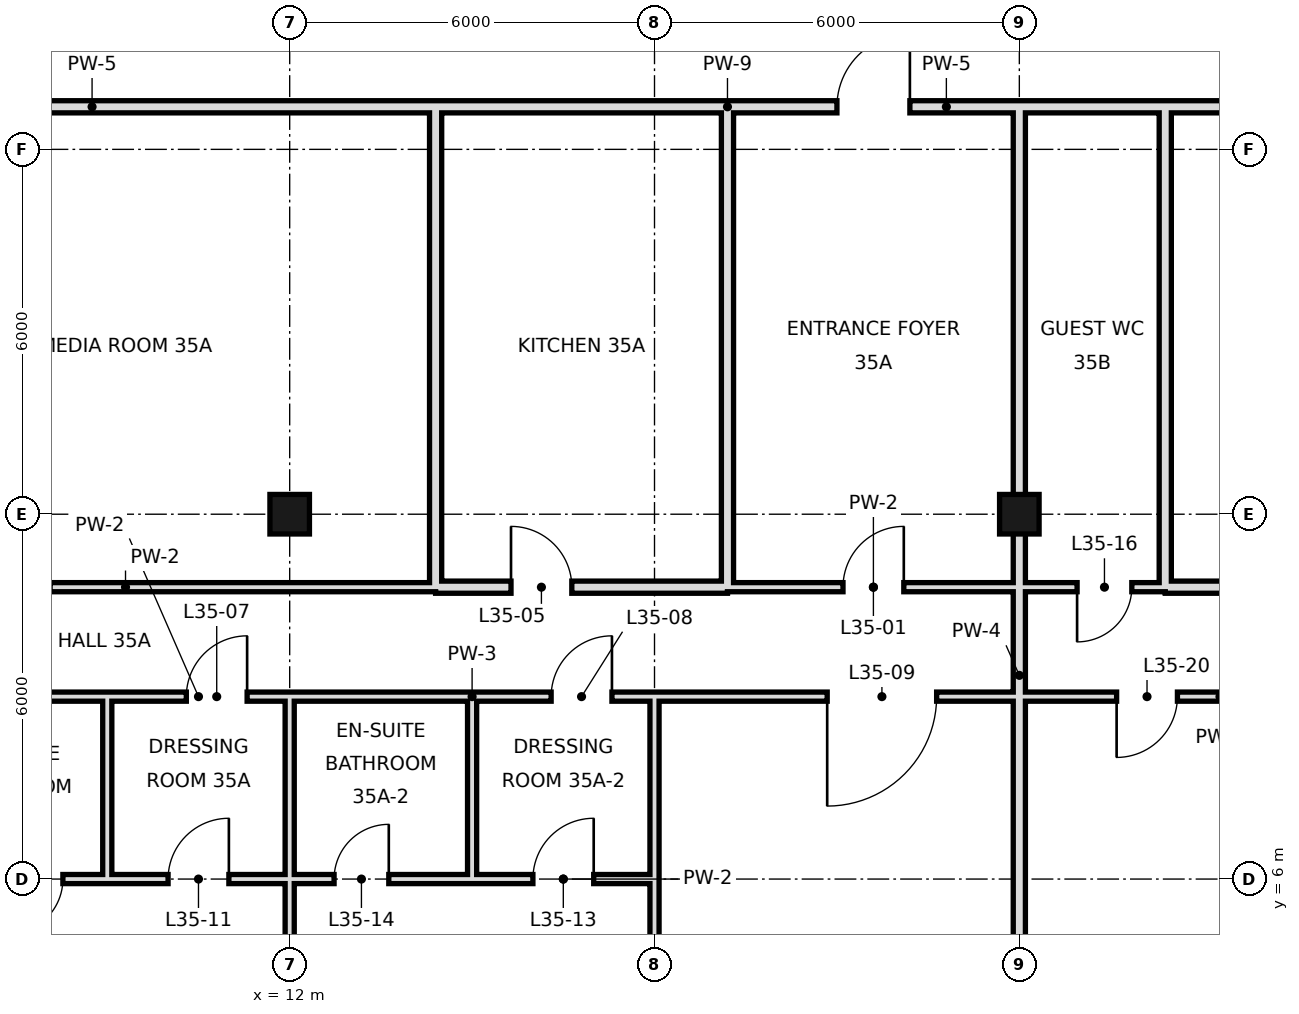
"""IFC4 building model, lengths in metres.
Left out: names, types, materials, properties, quantities, classifications, styles, units other than length and angle.
Written with IfcOpenShell. Run it as: python <this file> out.ifc"""

import sys

from ifc_helpers import new_model, si_unit, direction, frame, frame_2d, origin, origin_2d, place, context, subcontext, project, spatial, rectangle, hollow_rectangle, extrude, element, fill, save


model = new_model("IFC4")
c1 = context("Model", 3, precision=1e-05, world=origin(), true_north=direction((0.0, 1.0)))
c2 = subcontext(c1, "Body", "Model", "MODEL_VIEW")
j1 = project(units=[si_unit("LENGTHUNIT", "METRE"), si_unit("PLANEANGLEUNIT", "RADIAN")], contexts=[c1])
p1 = place(None, origin())
s1 = spatial("IfcSite", under=j1, at=p1, CompositionType="ELEMENT")
p2 = place(p1, origin())
s2 = spatial("IfcBuilding", under=s1, at=p2, CompositionType="ELEMENT")
p3 = place(p2, frame((0.0, 0.0, 154.6)))
s3 = spatial("IfcBuildingStorey", under=s2, at=p3, CompositionType="ELEMENT", Elevation=154.6)
for number, where, z_axis, x_axis in (
    (1, (12.0, 12.0, 0.0), (0.0, 0.0, 1.0), (1.0, 0.0, 0.0)),
    (2, (24.0, 12.0, 0.0), (0.0, 0.0, 1.0), (1.0, 0.0, 0.0)),
):
    element("IfcColumn", number, at=place(p3, frame(where, z_axis=z_axis, x_axis=x_axis)), inside=s3, PredefinedType="COLUMN", context=c2, shape_type="SweptSolid", body=[
        extrude(hollow_rectangle(XDim=0.65, YDim=0.65, WallThickness=0.032, at=origin_2d()), origin(), (0.0, 0.0, 1.0), 3.6),
    ])
p4 = place(p3, frame((12.0, 0.0, 0.0), z_axis=(0.0, 0.0, 1.0), x_axis=(0.0, 1.0, 0.0)))
e3 = element("IfcWall", 3, at=p4, inside=s3, PredefinedType="PARTITIONING", context=c2, shape_type="SweptSolid", body=[
    extrude(rectangle(XDim=6.0, YDim=0.15, at=frame_2d((3.0, 0.0))), origin(), (0.0, 0.0, 1.0), 2.72),
])
p5 = place(p3, frame((12.0, 6.0, 0.0), z_axis=(0.0, 0.0, 1.0), x_axis=(0.0, 1.0, 0.0)))
e4 = element("IfcWall", 4, at=p5, inside=s3, PredefinedType="PARTITIONING", context=c2, shape_type="SweptSolid", body=[
    extrude(rectangle(XDim=3.0, YDim=0.15, at=frame_2d((1.5, 0.0))), origin(), (0.0, 0.0, 1.0), 2.72),
])
p6 = place(p3, frame((14.4, 10.8, 0.0), z_axis=(0.0, 0.0, 1.0), x_axis=(0.0, 1.0, 0.0)))
e5 = element("IfcWall", 5, at=p6, inside=s3, PredefinedType="SOLIDWALL", context=c2, shape_type="SweptSolid", body=[
    extrude(rectangle(XDim=7.9, YDim=0.2, at=frame_2d((3.95, 0.0))), origin(), (0.0, 0.0, 1.0), 2.72),
])
p7 = place(p3, frame((15.0, 6.0, 0.0), z_axis=(0.0, 0.0, 1.0), x_axis=(0.0, 1.0, 0.0)))
e6 = element("IfcWall", 6, at=p7, inside=s3, PredefinedType="PARTITIONING", context=c2, shape_type="SweptSolid", body=[
    extrude(rectangle(XDim=3.0, YDim=0.15, at=frame_2d((1.5, 0.0))), origin(), (0.0, 0.0, 1.0), 3.42),
])
p8 = place(p3, frame((18.0, -0.6, 0.0), z_axis=(0.0, 0.0, 1.0), x_axis=(0.0, 1.0, 0.0)))
e7 = element("IfcWall", 7, at=p8, inside=s3, PredefinedType="PARTITIONING", context=c2, shape_type="SweptSolid", body=[
    extrude(rectangle(XDim=9.6, YDim=0.15, at=frame_2d((4.8, 0.0))), origin(), (0.0, 0.0, 1.0), 2.72),
])
p9 = place(p3, frame((19.2, 10.8, 0.0), z_axis=(0.0, 0.0, 1.0), x_axis=(0.0, 1.0, 0.0)))
e8 = element("IfcWall", 8, at=p9, inside=s3, PredefinedType="SOLIDWALL", context=c2, shape_type="SweptSolid", body=[
    extrude(rectangle(XDim=7.9, YDim=0.2, at=frame_2d((3.95, 0.0))), origin(), (0.0, 0.0, 1.0), 2.72),
])
p10 = place(p3, frame((24.0, 0.0, 0.0), z_axis=(0.0, 0.0, 1.0), x_axis=(0.0, 1.0, 0.0)))
e9 = element("IfcWall", 9, at=p10, inside=s3, PredefinedType="SOLIDWALL", context=c2, shape_type="SweptSolid", body=[
    extrude(rectangle(XDim=18.7, YDim=0.2, at=frame_2d((9.35, 0.0))), origin(), (0.0, 0.0, 1.0), 2.72),
])
p11 = place(p3, frame((26.4, 10.8, 0.0), z_axis=(0.0, 0.0, 1.0), x_axis=(0.0, 1.0, 0.0)))
e10 = element("IfcWall", 10, at=p11, inside=s3, PredefinedType="SOLIDWALL", context=c2, shape_type="SweptSolid", body=[
    extrude(rectangle(XDim=7.9, YDim=0.2, at=frame_2d((3.95, 0.0))), origin(), (0.0, 0.0, 1.0), 2.72),
])
p12 = place(p3, frame((9.0, 6.0, 0.0), z_axis=(0.0, 0.0, 1.0), x_axis=(0.0, 1.0, 0.0)))
e11 = element("IfcWall", 11, at=p12, inside=s3, PredefinedType="PARTITIONING", context=c2, shape_type="SweptSolid", body=[
    extrude(rectangle(XDim=3.0, YDim=0.15, at=frame_2d((1.5, 0.0))), origin(), (0.0, 0.0, 1.0), 3.42),
])
p13 = place(p3, frame((14.4, 10.8, 0.0), z_axis=(0.0, 0.0, 1.0), x_axis=(1.0, 0.0, 0.0)))
e12 = element("IfcWall", 12, at=p13, inside=s3, PredefinedType="SOLIDWALL", context=c2, shape_type="SweptSolid", body=[
    extrude(rectangle(XDim=4.8, YDim=0.2, at=frame_2d((2.4, 0.0))), origin(), (0.0, 0.0, 1.0), 2.72),
])
p14 = place(p13, frame((1.24, 0.0, 0.0)))
e13 = element("IfcOpeningElement", 13, at=p14, cuts=e12, PredefinedType="OPENING", context=c2, shape_type="SweptSolid", body=[
    extrude(rectangle(XDim=1.0, YDim=2.4, at=frame_2d((0.5, 1.2))), frame((0.0, 0.11, 0.0), z_axis=(0.0, -1.0, 0.0), x_axis=(1.0, 0.0, 0.0)), (0.0, 0.0, 1.0), 0.22),
])
p15 = place(p3, frame((26.4, 10.8, 0.0), z_axis=(0.0, 0.0, 1.0), x_axis=(1.0, 0.0, 0.0)))
e14 = element("IfcWall", 14, at=p15, inside=s3, PredefinedType="SOLIDWALL", context=c2, shape_type="SweptSolid", body=[
    extrude(rectangle(XDim=5.4, YDim=0.2, at=frame_2d((2.7, 0.0))), origin(), (0.0, 0.0, 1.0), 2.72),
])
p16 = place(p15, frame((2.2, 0.0, 0.0)))
e15 = element("IfcOpeningElement", 15, at=p16, cuts=e14, PredefinedType="OPENING", context=c2, shape_type="SweptSolid", body=[
    extrude(rectangle(XDim=1.0, YDim=2.4, at=frame_2d((0.5, 1.2))), frame((0.0, 0.11, 0.0), z_axis=(0.0, -1.0, 0.0), x_axis=(1.0, 0.0, 0.0)), (0.0, 0.0, 1.0), 0.22),
])
p17 = place(p3, frame((4.2, 10.8, 0.0), z_axis=(0.0, 0.0, 1.0), x_axis=(1.0, 0.0, 0.0)))
e16 = element("IfcWall", 16, at=p17, inside=s3, PredefinedType="PARTITIONING", context=c2, shape_type="SweptSolid", body=[
    extrude(rectangle(XDim=10.2, YDim=0.15, at=frame_2d((5.1, 0.0))), origin(), (0.0, 0.0, 1.0), 3.42),
])
p18 = place(p17, frame((2.86, 0.0, 0.0)))
e17 = element("IfcOpeningElement", 17, at=p18, cuts=e16, PredefinedType="OPENING", context=c2, shape_type="SweptSolid", body=[
    extrude(rectangle(XDim=1.0, YDim=2.4, at=frame_2d((0.5, 1.2))), frame((0.0, 0.085, 0.0), z_axis=(0.0, -1.0, 0.0), x_axis=(1.0, 0.0, 0.0)), (0.0, 0.0, 1.0), 0.17),
])
p19 = place(p3, frame((19.2, 10.8, 0.0), z_axis=(0.0, 0.0, 1.0), x_axis=(1.0, 0.0, 0.0)))
e18 = element("IfcWall", 18, at=p19, inside=s3, PredefinedType="PARTITIONING", context=c2, shape_type="SweptSolid", body=[
    extrude(rectangle(XDim=4.8, YDim=0.15, at=frame_2d((2.4, 0.0))), origin(), (0.0, 0.0, 1.0), 3.42),
])
p20 = place(p19, frame((1.9, 0.0, 0.0)))
e19 = element("IfcOpeningElement", 19, at=p20, cuts=e18, PredefinedType="OPENING", context=c2, shape_type="SweptSolid", body=[
    extrude(rectangle(XDim=1.0, YDim=2.4, at=frame_2d((0.5, 1.2))), frame((0.0, 0.085, 0.0), z_axis=(0.0, -1.0, 0.0), x_axis=(1.0, 0.0, 0.0)), (0.0, 0.0, 1.0), 0.17),
])
p21 = place(p3, frame((24.0, 10.8, 0.0), z_axis=(0.0, 0.0, 1.0), x_axis=(1.0, 0.0, 0.0)))
e20 = element("IfcWall", 20, at=p21, inside=s3, PredefinedType="PARTITIONING", context=c2, shape_type="SweptSolid", body=[
    extrude(rectangle(XDim=2.4, YDim=0.15, at=frame_2d((1.2, 0.0))), origin(), (0.0, 0.0, 1.0), 3.42),
])
p22 = place(p21, frame((0.95, 0.0, 0.0)))
e21 = element("IfcOpeningElement", 21, at=p22, cuts=e20, PredefinedType="OPENING", context=c2, shape_type="SweptSolid", body=[
    extrude(rectangle(XDim=0.9, YDim=2.4, at=frame_2d((0.45, 1.2))), frame((0.0, 0.085, 0.0), z_axis=(0.0, -1.0, 0.0), x_axis=(1.0, 0.0, 0.0)), (0.0, 0.0, 1.0), 0.17),
])
p23 = place(p3, frame((3.1, 18.7, 0.0), z_axis=(0.0, 0.0, 1.0), x_axis=(1.0, 0.0, 0.0)))
e22 = element("IfcWall", 22, at=p23, inside=s3, PredefinedType="SOLIDWALL", context=c2, shape_type="SweptSolid", body=[
    extrude(rectangle(XDim=11.3, YDim=0.2, at=frame_2d((5.65, 0.0))), origin(), (0.0, 0.0, 1.0), 2.72),
])
p24 = place(p3, frame((19.2, 18.7, 0.0), z_axis=(0.0, 0.0, 1.0), x_axis=(1.0, 0.0, 0.0)))
e23 = element("IfcWall", 23, at=p24, inside=s3, PredefinedType="SOLIDWALL", context=c2, shape_type="SweptSolid", body=[
    extrude(rectangle(XDim=7.2, YDim=0.2, at=frame_2d((3.6, 0.0))), origin(), (0.0, 0.0, 1.0), 3.42),
])
p25 = place(p24, frame((1.8, 0.0, 0.0)))
e24 = element("IfcOpeningElement", 24, at=p25, cuts=e23, PredefinedType="OPENING", context=c2, shape_type="SweptSolid", body=[
    extrude(rectangle(XDim=1.2, YDim=2.4, at=frame_2d((0.6, 1.2))), frame((0.0, 0.11, 0.0), z_axis=(0.0, -1.0, 0.0), x_axis=(1.0, 0.0, 0.0)), (0.0, 0.0, 1.0), 0.22),
])
p26 = place(p3, frame((14.4, 18.7, 0.0), z_axis=(0.0, 0.0, 1.0), x_axis=(1.0, 0.0, 0.0)))
e25 = element("IfcWall", 25, at=p26, inside=s3, PredefinedType="SOLIDWALL", context=c2, shape_type="SweptSolid", body=[
    extrude(rectangle(XDim=4.8, YDim=0.2, at=frame_2d((2.4, 0.0))), origin(), (0.0, 0.0, 1.0), 2.72),
])
p27 = place(p3, frame((26.4, 18.7, 0.0), z_axis=(0.0, 0.0, 1.0), x_axis=(1.0, 0.0, 0.0)))
e26 = element("IfcWall", 26, at=p27, inside=s3, PredefinedType="SOLIDWALL", context=c2, shape_type="SweptSolid", body=[
    extrude(rectangle(XDim=5.4, YDim=0.2, at=frame_2d((2.7, 0.0))), origin(), (0.0, 0.0, 1.0), 2.72),
])
p28 = place(p3, frame((9.0, 6.0, 0.0), z_axis=(0.0, 0.0, 1.0), x_axis=(1.0, 0.0, 0.0)))
e27 = element("IfcWall", 27, at=p28, inside=s3, PredefinedType="PARTITIONING", context=c2, shape_type="SweptSolid", body=[
    extrude(rectangle(XDim=3.0, YDim=0.15, at=frame_2d((1.5, 0.0))), origin(), (0.0, 0.0, 1.0), 2.97),
])
p29 = place(p28, frame((1.0, 0.0, 0.0)))
e28 = element("IfcOpeningElement", 28, at=p29, cuts=e27, PredefinedType="OPENING", context=c2, shape_type="SweptSolid", body=[
    extrude(rectangle(XDim=1.0, YDim=2.4, at=frame_2d((0.5, 1.2))), frame((0.0, 0.085, 0.0), z_axis=(0.0, -1.0, 0.0), x_axis=(1.0, 0.0, 0.0)), (0.0, 0.0, 1.0), 0.17),
])
p30 = place(p3, frame((15.0, 6.0, 0.0), z_axis=(0.0, 0.0, 1.0), x_axis=(1.0, 0.0, 0.0)))
e29 = element("IfcWall", 29, at=p30, inside=s3, PredefinedType="PARTITIONING", context=c2, shape_type="SweptSolid", body=[
    extrude(rectangle(XDim=3.0, YDim=0.15, at=frame_2d((1.5, 0.0))), origin(), (0.0, 0.0, 1.0), 2.97),
])
p31 = place(p30, frame((1.0, 0.0, 0.0)))
e30 = element("IfcOpeningElement", 30, at=p31, cuts=e29, PredefinedType="OPENING", context=c2, shape_type="SweptSolid", body=[
    extrude(rectangle(XDim=1.0, YDim=2.4, at=frame_2d((0.5, 1.2))), frame((0.0, 0.085, 0.0), z_axis=(0.0, -1.0, 0.0), x_axis=(1.0, 0.0, 0.0)), (0.0, 0.0, 1.0), 0.17),
])
p32 = place(p3, frame((6.0, 6.0, 0.0), z_axis=(0.0, 0.0, 1.0), x_axis=(1.0, 0.0, 0.0)))
e31 = element("IfcWall", 31, at=p32, inside=s3, PredefinedType="PARTITIONING", context=c2, shape_type="SweptSolid", body=[
    extrude(rectangle(XDim=3.0, YDim=0.15, at=frame_2d((1.5, 0.0))), origin(), (0.0, 0.0, 1.0), 2.97),
])
p33 = place(p32, frame((1.37, 0.0, 0.0)))
e32 = element("IfcOpeningElement", 32, at=p33, cuts=e31, PredefinedType="OPENING", context=c2, shape_type="SweptSolid", body=[
    extrude(rectangle(XDim=0.9, YDim=2.4, at=frame_2d((0.45, 1.2))), frame((0.0, 0.085, 0.0), z_axis=(0.0, -1.0, 0.0), x_axis=(1.0, 0.0, 0.0)), (0.0, 0.0, 1.0), 0.17),
])
p34 = place(p3, frame((12.0, 6.0, 0.0), z_axis=(0.0, 0.0, 1.0), x_axis=(1.0, 0.0, 0.0)))
e33 = element("IfcWall", 33, at=p34, inside=s3, PredefinedType="PARTITIONING", context=c2, shape_type="SweptSolid", body=[
    extrude(rectangle(XDim=3.0, YDim=0.15, at=frame_2d((1.5, 0.0))), origin(), (0.0, 0.0, 1.0), 2.97),
])
p35 = place(p34, frame((0.73, 0.0, 0.0)))
e34 = element("IfcOpeningElement", 34, at=p35, cuts=e33, PredefinedType="OPENING", context=c2, shape_type="SweptSolid", body=[
    extrude(rectangle(XDim=0.9, YDim=2.4, at=frame_2d((0.45, 1.2))), frame((0.0, 0.085, 0.0), z_axis=(0.0, -1.0, 0.0), x_axis=(1.0, 0.0, 0.0)), (0.0, 0.0, 1.0), 0.17),
])
p36 = place(p3, frame((9.0, 9.0, 0.0), z_axis=(0.0, 0.0, 1.0), x_axis=(1.0, 0.0, 0.0)))
e35 = element("IfcWall", 35, at=p36, inside=s3, PredefinedType="PARTITIONING", context=c2, shape_type="SweptSolid", body=[
    extrude(rectangle(XDim=3.0, YDim=0.15, at=frame_2d((1.5, 0.0))), origin(), (0.0, 0.0, 1.0), 3.42),
])
p37 = place(p36, frame((1.3, 0.0, 0.0)))
e36 = element("IfcOpeningElement", 36, at=p37, cuts=e35, PredefinedType="OPENING", context=c2, shape_type="SweptSolid", body=[
    extrude(rectangle(XDim=1.0, YDim=2.4, at=frame_2d((0.5, 1.2))), frame((0.0, 0.085, 0.0), z_axis=(0.0, -1.0, 0.0), x_axis=(1.0, 0.0, 0.0)), (0.0, 0.0, 1.0), 0.17),
])
p38 = place(p3, frame((15.0, 9.0, 0.0), z_axis=(0.0, 0.0, 1.0), x_axis=(1.0, 0.0, 0.0)))
e37 = element("IfcWall", 37, at=p38, inside=s3, PredefinedType="PARTITIONING", context=c2, shape_type="SweptSolid", body=[
    extrude(rectangle(XDim=24.6, YDim=0.15, at=frame_2d((12.3, 0.0))), origin(), (0.0, 0.0, 1.0), 3.42),
])
p39 = place(p38, frame((1.3, 0.0, 0.0)))
e38 = element("IfcOpeningElement", 38, at=p39, cuts=e37, PredefinedType="OPENING", context=c2, shape_type="SweptSolid", body=[
    extrude(rectangle(XDim=1.0, YDim=2.4, at=frame_2d((0.5, 1.2))), frame((0.0, 0.085, 0.0), z_axis=(0.0, -1.0, 0.0), x_axis=(1.0, 0.0, 0.0)), (0.0, 0.0, 1.0), 0.17),
])
p40 = place(p38, frame((5.84, 0.0, 0.0)))
e39 = element("IfcOpeningElement", 39, at=p40, cuts=e37, PredefinedType="OPENING", context=c2, shape_type="SweptSolid", body=[
    extrude(rectangle(XDim=1.8, YDim=2.4, at=frame_2d((0.9, 1.2))), frame((0.0, 0.085, 0.0), z_axis=(0.0, -1.0, 0.0), x_axis=(1.0, 0.0, 0.0)), (0.0, 0.0, 1.0), 0.17),
])
p41 = place(p38, frame((10.6, 0.0, 0.0)))
e40 = element("IfcOpeningElement", 40, at=p41, cuts=e37, PredefinedType="OPENING", context=c2, shape_type="SweptSolid", body=[
    extrude(rectangle(XDim=1.0, YDim=2.4, at=frame_2d((0.5, 1.2))), frame((0.0, 0.085, 0.0), z_axis=(0.0, -1.0, 0.0), x_axis=(1.0, 0.0, 0.0)), (0.0, 0.0, 1.0), 0.17),
])
p42 = place(p38, frame((16.6, 0.0, 0.0)))
e41 = element("IfcOpeningElement", 41, at=p42, cuts=e37, PredefinedType="OPENING", context=c2, shape_type="SweptSolid", body=[
    extrude(rectangle(XDim=1.0, YDim=2.4, at=frame_2d((0.5, 1.2))), frame((0.0, 0.085, 0.0), z_axis=(0.0, -1.0, 0.0), x_axis=(1.0, 0.0, 0.0)), (0.0, 0.0, 1.0), 0.17),
])
p43 = place(p38, frame((22.72, 0.0, 0.0)))
e42 = element("IfcOpeningElement", 42, at=p43, cuts=e37, PredefinedType="OPENING", context=c2, shape_type="SweptSolid", body=[
    extrude(rectangle(XDim=1.0, YDim=2.4, at=frame_2d((0.5, 1.2))), frame((0.0, 0.085, 0.0), z_axis=(0.0, -1.0, 0.0), x_axis=(1.0, 0.0, 0.0)), (0.0, 0.0, 1.0), 0.17),
])
for number, where, z_axis, x_axis in (
    (43, (6.0, 9.0, 0.0), (0.0, 0.0, 1.0), (1.0, 0.0, 0.0)),
    (44, (12.0, 9.0, 0.0), (0.0, 0.0, 1.0), (1.0, 0.0, 0.0)),
):
    element("IfcWall", number, at=place(p3, frame(where, z_axis=z_axis, x_axis=x_axis)), inside=s3, PredefinedType="PARTITIONING", context=c2, shape_type="SweptSolid", body=[
        extrude(rectangle(XDim=3.0, YDim=0.15, at=frame_2d((1.5, 0.0))), origin(), (0.0, 0.0, 1.0), 3.42),
    ])
p44 = place(p20, frame((1.0, 0.0, 0.0), z_axis=(0.0, 0.0, 1.0), x_axis=(-1.0, 0.0, 0.0)))
e45 = element("IfcDoor", 45, at=p44, inside=s3, OperationType="SINGLE_SWING_LEFT", PredefinedType="DOOR", context=c2, shape_type="SweptSolid", body=[
    extrude(rectangle(XDim=1.0, YDim=2.4, at=frame_2d((0.5, 1.2))), frame((0.0, 0.025, 0.0), z_axis=(0.0, -1.0, 0.0), x_axis=(1.0, 0.0, 0.0)), (0.0, 0.0, 1.0), 0.05),
])
fill(e19, e45)
p45 = place(p14, origin())
e46 = element("IfcDoor", 46, at=p45, inside=s3, OperationType="SINGLE_SWING_LEFT", PredefinedType="DOOR", context=c2, shape_type="SweptSolid", body=[
    extrude(rectangle(XDim=1.0, YDim=2.4, at=frame_2d((0.5, 1.2))), frame((0.0, 0.025, 0.0), z_axis=(0.0, -1.0, 0.0), x_axis=(1.0, 0.0, 0.0)), (0.0, 0.0, 1.0), 0.05),
])
fill(e13, e46)
p46 = place(p37, frame((1.0, 0.0, 0.0), z_axis=(0.0, 0.0, 1.0), x_axis=(-1.0, 0.0, 0.0)))
e47 = element("IfcDoor", 47, at=p46, inside=s3, OperationType="SINGLE_SWING_LEFT", PredefinedType="DOOR", context=c2, shape_type="SweptSolid", body=[
    extrude(rectangle(XDim=1.0, YDim=2.4, at=frame_2d((0.5, 1.2))), frame((0.0, 0.025, 0.0), z_axis=(0.0, -1.0, 0.0), x_axis=(1.0, 0.0, 0.0)), (0.0, 0.0, 1.0), 0.05),
])
fill(e36, e47)
p47 = place(p39, frame((1.0, 0.0, 0.0), z_axis=(0.0, 0.0, 1.0), x_axis=(-1.0, 0.0, 0.0)))
e48 = element("IfcDoor", 48, at=p47, inside=s3, OperationType="SINGLE_SWING_LEFT", PredefinedType="DOOR", context=c2, shape_type="SweptSolid", body=[
    extrude(rectangle(XDim=1.0, YDim=2.4, at=frame_2d((0.5, 1.2))), frame((0.0, 0.025, 0.0), z_axis=(0.0, -1.0, 0.0), x_axis=(1.0, 0.0, 0.0)), (0.0, 0.0, 1.0), 0.05),
])
fill(e38, e48)
p48 = place(p40, frame((1.8, 0.0, 0.0), z_axis=(0.0, 0.0, 1.0), x_axis=(-1.0, 0.0, 0.0)))
e49 = element("IfcDoor", 49, at=p48, inside=s3, OperationType="SINGLE_SWING_RIGHT", PredefinedType="DOOR", context=c2, shape_type="SweptSolid", body=[
    extrude(rectangle(XDim=1.8, YDim=2.4, at=frame_2d((0.9, 1.2))), frame((0.0, 0.025, 0.0), z_axis=(0.0, -1.0, 0.0), x_axis=(1.0, 0.0, 0.0)), (0.0, 0.0, 1.0), 0.05),
])
fill(e39, e49)
p49 = place(p29, frame((1.0, 0.0, 0.0), z_axis=(0.0, 0.0, 1.0), x_axis=(-1.0, 0.0, 0.0)))
e50 = element("IfcDoor", 50, at=p49, inside=s3, OperationType="SINGLE_SWING_LEFT", PredefinedType="DOOR", context=c2, shape_type="SweptSolid", body=[
    extrude(rectangle(XDim=1.0, YDim=2.4, at=frame_2d((0.5, 1.2))), frame((0.0, 0.025, 0.0), z_axis=(0.0, -1.0, 0.0), x_axis=(1.0, 0.0, 0.0)), (0.0, 0.0, 1.0), 0.05),
])
fill(e28, e50)
p50 = place(p33, frame((0.9, 0.0, 0.0), z_axis=(0.0, 0.0, 1.0), x_axis=(-1.0, 0.0, 0.0)))
e51 = element("IfcDoor", 51, at=p50, inside=s3, OperationType="SINGLE_SWING_RIGHT", PredefinedType="DOOR", context=c2, shape_type="SweptSolid", body=[
    extrude(rectangle(XDim=0.9, YDim=2.4, at=frame_2d((0.45, 1.2))), frame((0.0, 0.025, 0.0), z_axis=(0.0, -1.0, 0.0), x_axis=(1.0, 0.0, 0.0)), (0.0, 0.0, 1.0), 0.05),
])
fill(e32, e51)
p51 = place(p31, frame((1.0, 0.0, 0.0), z_axis=(0.0, 0.0, 1.0), x_axis=(-1.0, 0.0, 0.0)))
e52 = element("IfcDoor", 52, at=p51, inside=s3, OperationType="SINGLE_SWING_LEFT", PredefinedType="DOOR", context=c2, shape_type="SweptSolid", body=[
    extrude(rectangle(XDim=1.0, YDim=2.4, at=frame_2d((0.5, 1.2))), frame((0.0, 0.025, 0.0), z_axis=(0.0, -1.0, 0.0), x_axis=(1.0, 0.0, 0.0)), (0.0, 0.0, 1.0), 0.05),
])
fill(e30, e52)
p52 = place(p35, frame((0.9, 0.0, 0.0), z_axis=(0.0, 0.0, 1.0), x_axis=(-1.0, 0.0, 0.0)))
e53 = element("IfcDoor", 53, at=p52, inside=s3, OperationType="SINGLE_SWING_LEFT", PredefinedType="DOOR", context=c2, shape_type="SweptSolid", body=[
    extrude(rectangle(XDim=0.9, YDim=2.4, at=frame_2d((0.45, 1.2))), frame((0.0, 0.025, 0.0), z_axis=(0.0, -1.0, 0.0), x_axis=(1.0, 0.0, 0.0)), (0.0, 0.0, 1.0), 0.05),
])
fill(e34, e53)
p53 = place(p22, frame((0.9, 0.0, 0.0), z_axis=(0.0, 0.0, 1.0), x_axis=(-1.0, 0.0, 0.0)))
e54 = element("IfcDoor", 54, at=p53, inside=s3, OperationType="SINGLE_SWING_RIGHT", PredefinedType="DOOR", context=c2, shape_type="SweptSolid", body=[
    extrude(rectangle(XDim=0.9, YDim=2.4, at=frame_2d((0.45, 1.2))), frame((0.0, 0.025, 0.0), z_axis=(0.0, -1.0, 0.0), x_axis=(1.0, 0.0, 0.0)), (0.0, 0.0, 1.0), 0.05),
])
fill(e21, e54)
p54 = place(p41, frame((1.0, 0.0, 0.0), z_axis=(0.0, 0.0, 1.0), x_axis=(-1.0, 0.0, 0.0)))
e55 = element("IfcDoor", 55, at=p54, inside=s3, OperationType="SINGLE_SWING_RIGHT", PredefinedType="DOOR", context=c2, shape_type="SweptSolid", body=[
    extrude(rectangle(XDim=1.0, YDim=2.4, at=frame_2d((0.5, 1.2))), frame((0.0, 0.025, 0.0), z_axis=(0.0, -1.0, 0.0), x_axis=(1.0, 0.0, 0.0)), (0.0, 0.0, 1.0), 0.05),
])
fill(e40, e55)
p55 = place(p25, frame((1.2, 0.0, 0.0), z_axis=(0.0, 0.0, 1.0), x_axis=(-1.0, 0.0, 0.0)))
e56 = element("IfcDoor", 56, at=p55, inside=s3, OperationType="SINGLE_SWING_LEFT", PredefinedType="DOOR", context=c2, shape_type="SweptSolid", body=[
    extrude(rectangle(XDim=1.2, YDim=2.4, at=frame_2d((0.6, 1.2))), frame((0.0, 0.025, 0.0), z_axis=(0.0, -1.0, 0.0), x_axis=(1.0, 0.0, 0.0)), (0.0, 0.0, 1.0), 0.05),
])
fill(e24, e56)
save(model, sys.argv[1])
